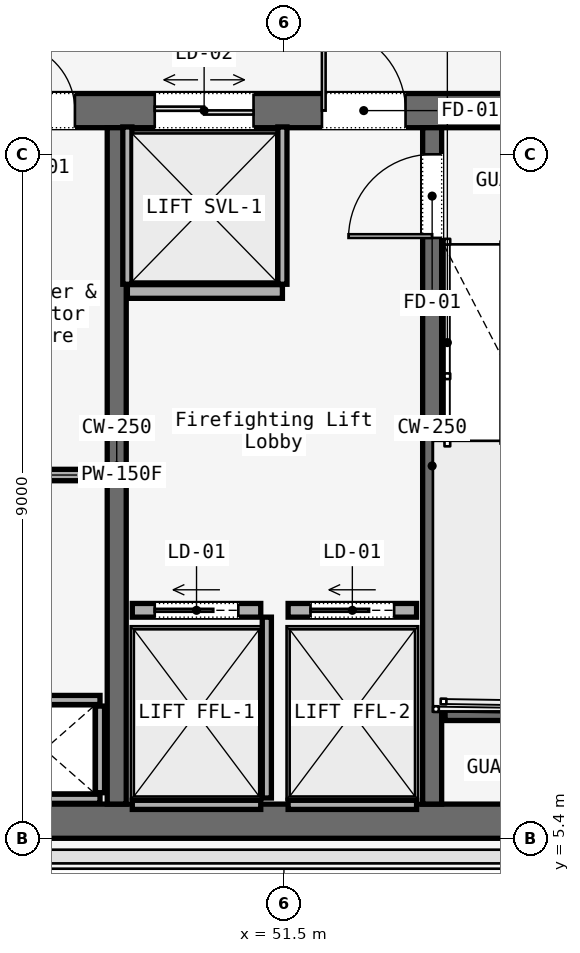
"""IFC4 building model, lengths in metres.
Left out: names, types, materials, properties, quantities, classifications, styles, units other than length and angle.
Written with IfcOpenShell. Run it as: python <this file> out.ifc"""

import sys

from ifc_helpers import new_model, si_unit, direction, frame, frame_2d, origin, place, context, subcontext, project, spatial, rectangle, extrude, element, fill, save


model = new_model("IFC4")
c1 = context("Model", 3, precision=1e-05, world=origin(), true_north=direction((0.0, 1.0)))
c2 = subcontext(c1, "Body", "Model", "MODEL_VIEW")
j1 = project(units=[si_unit("LENGTHUNIT", "METRE"), si_unit("PLANEANGLEUNIT", "RADIAN")], contexts=[c1])
p1 = place(None, origin())
s1 = spatial("IfcSite", under=j1, at=p1, CompositionType="ELEMENT")
p2 = place(p1, origin())
s2 = spatial("IfcBuilding", under=s1, at=p2, CompositionType="ELEMENT")
p3 = place(p2, frame((0.0, 0.0, 66.4)))
s3 = spatial("IfcBuildingStorey", under=s2, at=p3, CompositionType="ELEMENT", Elevation=66.4)
p4 = place(p3, frame((26.45, 14.975, 0.0), z_axis=(0.0, 0.0, 1.0), x_axis=(1.0, 0.0, 0.0)))
e1 = element("IfcWall", 1, at=p4, inside=s3, PredefinedType="SOLIDWALL", context=c2, shape_type="SweptSolid", body=[
    extrude(rectangle(XDim=31.1, YDim=0.45, at=frame_2d((15.55, 0.0))), origin(), (0.0, 0.0, 1.0), 3.58),
])
p5 = place(p4, frame((1.65, 0.0, 0.0)))
e2 = element("IfcOpeningElement", 2, at=p5, cuts=e1, PredefinedType="OPENING", context=c2, shape_type="SweptSolid", body=[
    extrude(rectangle(XDim=1.1, YDim=2.2, at=frame_2d((0.55, 1.1))), frame((0.0, 0.225, 0.0), z_axis=(0.0, -1.0, 0.0), x_axis=(1.0, 0.0, 0.0)), (0.0, 0.0, 1.0), 0.45),
])
p6 = place(p4, frame((13.65, 0.0, 0.0)))
e3 = element("IfcOpeningElement", 3, at=p6, cuts=e1, PredefinedType="OPENING", context=c2, shape_type="SweptSolid", body=[
    extrude(rectangle(XDim=1.1, YDim=2.2, at=frame_2d((0.55, 1.1))), frame((0.0, 0.225, 0.0), z_axis=(0.0, -1.0, 0.0), x_axis=(1.0, 0.0, 0.0)), (0.0, 0.0, 1.0), 0.45),
])
p7 = place(p4, frame((25.55, 0.0, 0.0)))
e4 = element("IfcOpeningElement", 4, at=p7, cuts=e1, PredefinedType="OPENING", context=c2, shape_type="SweptSolid", body=[
    extrude(rectangle(XDim=1.1, YDim=2.2, at=frame_2d((0.55, 1.1))), frame((0.0, 0.225, 0.0), z_axis=(0.0, -1.0, 0.0), x_axis=(1.0, 0.0, 0.0)), (0.0, 0.0, 1.0), 0.45),
])
p8 = place(p4, frame((10.7, 0.0, 0.0)))
e5 = element("IfcOpeningElement", 5, at=p8, cuts=e1, PredefinedType="OPENING", context=c2, shape_type="SweptSolid", body=[
    extrude(rectangle(XDim=1.4, YDim=2.2, at=frame_2d((0.7, 1.1))), frame((0.0, 0.225, 0.0), z_axis=(0.0, -1.0, 0.0), x_axis=(1.0, 0.0, 0.0)), (0.0, 0.0, 1.0), 0.45),
])
p9 = place(p4, frame((19.35, 0.0, 0.0)))
e6 = element("IfcOpeningElement", 6, at=p9, cuts=e1, PredefinedType="OPENING", context=c2, shape_type="SweptSolid", body=[
    extrude(rectangle(XDim=1.1, YDim=2.2, at=frame_2d((0.55, 1.1))), frame((0.0, 0.225, 0.0), z_axis=(0.0, -1.0, 0.0), x_axis=(1.0, 0.0, 0.0)), (0.0, 0.0, 1.0), 0.45),
])
p10 = place(p4, frame((21.4, 0.0, 0.0)))
e7 = element("IfcOpeningElement", 7, at=p10, cuts=e1, PredefinedType="OPENING", context=c2, shape_type="SweptSolid", body=[
    extrude(rectangle(XDim=0.9, YDim=2.1, at=frame_2d((0.45, 1.05))), frame((0.0, 0.225, 0.0), z_axis=(0.0, -1.0, 0.0), x_axis=(1.0, 0.0, 0.0)), (0.0, 0.0, 1.0), 0.45),
])
p11 = place(p4, frame((23.35, 0.0, 0.0)))
e8 = element("IfcOpeningElement", 8, at=p11, cuts=e1, PredefinedType="OPENING", context=c2, shape_type="SweptSolid", body=[
    extrude(rectangle(XDim=1.3, YDim=2.3, at=frame_2d((0.65, 1.15))), frame((0.0, 0.225, 0.0), z_axis=(0.0, -1.0, 0.0), x_axis=(1.0, 0.0, 0.0)), (0.0, 0.0, 1.0), 0.45),
])
p12 = place(p3, frame((26.45, 5.625, 0.0), z_axis=(0.0, 0.0, 1.0), x_axis=(1.0, 0.0, 0.0)))
e9 = element("IfcWall", 9, at=p12, inside=s3, PredefinedType="SOLIDWALL", context=c2, shape_type="SweptSolid", body=[
    extrude(rectangle(XDim=31.1, YDim=0.45, at=frame_2d((15.55, 0.0))), origin(), (0.0, 0.0, 1.0), 3.58),
])
p13 = place(p3, frame((49.3, 5.85, 0.0), z_axis=(0.0, 0.0, 1.0), x_axis=(0.0, 1.0, 0.0)))
e10 = element("IfcWall", 10, at=p13, inside=s3, PredefinedType="SOLIDWALL", context=c2, shape_type="SweptSolid", body=[
    extrude(rectangle(XDim=8.9, YDim=0.25, at=frame_2d((4.45, 0.0))), origin(), (0.0, 0.0, 1.0), 3.58),
])
p14 = place(p3, frame((53.45, 5.85, 0.0), z_axis=(0.0, 0.0, 1.0), x_axis=(0.0, 1.0, 0.0)))
e11 = element("IfcWall", 11, at=p14, inside=s3, PredefinedType="SOLIDWALL", context=c2, shape_type="SweptSolid", body=[
    extrude(rectangle(XDim=8.9, YDim=0.25, at=frame_2d((4.45, 0.0))), origin(), (0.0, 0.0, 1.0), 3.58),
])
p15 = place(p14, frame((7.45, 0.0, 0.0)))
e12 = element("IfcOpeningElement", 12, at=p15, cuts=e11, PredefinedType="OPENING", context=c2, shape_type="SweptSolid", body=[
    extrude(rectangle(XDim=1.1, YDim=2.2, at=frame_2d((0.55, 1.1))), frame((0.0, 0.125, 0.0), z_axis=(0.0, -1.0, 0.0), x_axis=(1.0, 0.0, 0.0)), (0.0, 0.0, 1.0), 0.25),
])
p16 = place(p3, frame((53.62, 7.05, 0.0), z_axis=(0.0, 0.0, 1.0), x_axis=(1.0, 0.0, 0.0)))
e13 = element("IfcWall", 13, at=p16, inside=s3, PredefinedType="SOLIDWALL", context=c2, shape_type="SweptSolid", body=[
    extrude(rectangle(XDim=3.115, YDim=0.2, at=frame_2d((1.558, 0.0))), origin(), (0.0, 0.0, 1.0), 3.8),
])
for number, where, z_axis, x_axis in (
    (14, (47.62, 5.92, 0.0), (0.0, 0.0, 1.0), (1.0, 0.0, 0.0)),
    (15, (47.62, 7.22, 0.0), (0.0, 0.0, 1.0), (1.0, 0.0, 0.0)),
):
    element("IfcWall", number, at=place(p3, frame(where, z_axis=z_axis, x_axis=x_axis)), inside=s3, PredefinedType="SOLIDWALL", context=c2, shape_type="SweptSolid", body=[
        extrude(rectangle(XDim=1.46, YDim=0.12, at=frame_2d((0.73, 0.0))), origin(), (0.0, 0.0, 1.0), 2.95),
    ])
p17 = place(p3, frame((49.08, 6.0, 0.0), z_axis=(0.0, 0.0, 1.0), x_axis=(0.0, 1.0, 0.0)))
e16 = element("IfcWall", 16, at=p17, inside=s3, PredefinedType="SOLIDWALL", context=c2, shape_type="SweptSolid", body=[
    extrude(rectangle(XDim=1.14, YDim=0.12, at=frame_2d((0.57, 0.0))), origin(), (0.0, 0.0, 1.0), 2.95),
])
p18 = place(p3, frame((47.45, 10.18, 0.0), z_axis=(0.0, 0.0, 1.0), x_axis=(1.0, 0.0, 0.0)))
e17 = element("IfcWall", 17, at=p18, inside=s3, PredefinedType="PARTITIONING", context=c2, shape_type="SweptSolid", body=[
    extrude(rectangle(XDim=1.73, YDim=0.15, at=frame_2d((0.865, 0.0))), origin(), (0.0, 0.0, 1.0), 2.95),
])
p19 = place(p3, frame((49.505, 8.4, 0.0), z_axis=(0.0, 0.0, 1.0), x_axis=(1.0, 0.0, 0.0)))
e18 = element("IfcWall", 18, at=p19, inside=s3, PredefinedType="SOLIDWALL", context=c2, shape_type="SweptSolid", body=[
    extrude(rectangle(XDim=1.69, YDim=0.18, at=frame_2d((0.845, 0.0))), origin(), (0.0, 0.0, 1.0), 2.95),
])
p20 = place(p19, frame((0.295, 0.0, 0.0)))
e19 = element("IfcOpeningElement", 19, at=p20, cuts=e18, PredefinedType="OPENING", context=c2, shape_type="SweptSolid", body=[
    extrude(rectangle(XDim=1.1, YDim=2.2, at=frame_2d((0.55, 1.1))), frame((0.0, 0.09, 0.0), z_axis=(0.0, -1.0, 0.0), x_axis=(1.0, 0.0, 0.0)), (0.0, 0.0, 1.0), 0.18),
])
p21 = place(p3, frame((49.505, 5.84, 0.0), z_axis=(0.0, 0.0, 1.0), x_axis=(1.0, 0.0, 0.0)))
e20 = element("IfcWall", 20, at=p21, inside=s3, PredefinedType="SOLIDWALL", context=c2, shape_type="SweptSolid", body=[
    extrude(rectangle(XDim=1.69, YDim=0.12, at=frame_2d((0.845, 0.0))), origin(), (0.0, 0.0, 1.0), 2.95),
])
p22 = place(p3, frame((51.275, 5.93, 0.0), z_axis=(0.0, 0.0, 1.0), x_axis=(0.0, 1.0, 0.0)))
e21 = element("IfcWall", 21, at=p22, inside=s3, PredefinedType="SOLIDWALL", context=c2, shape_type="SweptSolid", body=[
    extrude(rectangle(XDim=2.38, YDim=0.12, at=frame_2d((1.19, 0.0))), origin(), (0.0, 0.0, 1.0), 2.95),
])
p23 = place(p3, frame((51.555, 8.4, 0.0), z_axis=(0.0, 0.0, 1.0), x_axis=(1.0, 0.0, 0.0)))
e22 = element("IfcWall", 22, at=p23, inside=s3, PredefinedType="SOLIDWALL", context=c2, shape_type="SweptSolid", body=[
    extrude(rectangle(XDim=1.69, YDim=0.18, at=frame_2d((0.845, 0.0))), origin(), (0.0, 0.0, 1.0), 2.95),
])
p24 = place(p23, frame((0.295, 0.0, 0.0)))
e23 = element("IfcOpeningElement", 23, at=p24, cuts=e22, PredefinedType="OPENING", context=c2, shape_type="SweptSolid", body=[
    extrude(rectangle(XDim=1.1, YDim=2.2, at=frame_2d((0.55, 1.1))), frame((0.0, 0.09, 0.0), z_axis=(0.0, -1.0, 0.0), x_axis=(1.0, 0.0, 0.0)), (0.0, 0.0, 1.0), 0.18),
])
p25 = place(p3, frame((51.555, 5.84, 0.0), z_axis=(0.0, 0.0, 1.0), x_axis=(1.0, 0.0, 0.0)))
e24 = element("IfcWall", 24, at=p25, inside=s3, PredefinedType="SOLIDWALL", context=c2, shape_type="SweptSolid", body=[
    extrude(rectangle(XDim=1.69, YDim=0.12, at=frame_2d((0.845, 0.0))), origin(), (0.0, 0.0, 1.0), 2.95),
])
p26 = place(p3, frame((49.44, 12.595, 0.0), z_axis=(0.0, 0.0, 1.0), x_axis=(1.0, 0.0, 0.0)))
e25 = element("IfcWall", 25, at=p26, inside=s3, PredefinedType="SOLIDWALL", context=c2, shape_type="SweptSolid", body=[
    extrude(rectangle(XDim=2.04, YDim=0.18, at=frame_2d((1.02, 0.0))), origin(), (0.0, 0.0, 1.0), 2.95),
])
for number, where, z_axis, x_axis in (
    (26, (49.44, 12.69, 0.0), (0.0, 0.0, 1.0), (0.0, 1.0, 0.0)),
    (27, (51.48, 12.69, 0.0), (0.0, 0.0, 1.0), (0.0, 1.0, 0.0)),
):
    element("IfcWall", number, at=place(p3, frame(where, z_axis=z_axis, x_axis=x_axis)), inside=s3, PredefinedType="SOLIDWALL", context=c2, shape_type="SweptSolid", body=[
        extrude(rectangle(XDim=2.07, YDim=0.12, at=frame_2d((1.035, 0.0))), origin(), (0.0, 0.0, 1.0), 2.95),
    ])
p27 = place(p7, origin())
e28 = element("IfcDoor", 28, at=p27, inside=s3, OperationType="SINGLE_SWING_RIGHT", PredefinedType="DOOR", context=c2, shape_type="SweptSolid", body=[
    extrude(rectangle(XDim=1.1, YDim=2.2, at=frame_2d((0.55, 1.1))), frame((0.0, 0.025, 0.0), z_axis=(0.0, -1.0, 0.0), x_axis=(1.0, 0.0, 0.0)), (0.0, 0.0, 1.0), 0.05),
])
fill(e4, e28)
p28 = place(p10, origin())
e29 = element("IfcDoor", 29, at=p28, inside=s3, OperationType="SINGLE_SWING_LEFT", PredefinedType="DOOR", context=c2, shape_type="SweptSolid", body=[
    extrude(rectangle(XDim=0.9, YDim=2.1, at=frame_2d((0.45, 1.05))), frame((0.0, 0.025, 0.0), z_axis=(0.0, -1.0, 0.0), x_axis=(1.0, 0.0, 0.0)), (0.0, 0.0, 1.0), 0.05),
])
fill(e7, e29)
p29 = place(p15, origin())
e30 = element("IfcDoor", 30, at=p29, inside=s3, OperationType="SINGLE_SWING_LEFT", PredefinedType="DOOR", context=c2, shape_type="SweptSolid", body=[
    extrude(rectangle(XDim=1.1, YDim=2.2, at=frame_2d((0.55, 1.1))), frame((0.0, 0.025, 0.0), z_axis=(0.0, -1.0, 0.0), x_axis=(1.0, 0.0, 0.0)), (0.0, 0.0, 1.0), 0.05),
])
fill(e12, e30)
p30 = place(p20, origin())
e31 = element("IfcDoor", 31, at=p30, inside=s3, OperationType="SLIDING_TO_LEFT", PredefinedType="DOOR", context=c2, shape_type="SweptSolid", body=[
    extrude(rectangle(XDim=1.1, YDim=2.2, at=frame_2d((0.55, 1.1))), frame((0.0, 0.025, 0.0), z_axis=(0.0, -1.0, 0.0), x_axis=(1.0, 0.0, 0.0)), (0.0, 0.0, 1.0), 0.05),
])
fill(e19, e31)
p31 = place(p24, origin())
e32 = element("IfcDoor", 32, at=p31, inside=s3, OperationType="SLIDING_TO_LEFT", PredefinedType="DOOR", context=c2, shape_type="SweptSolid", body=[
    extrude(rectangle(XDim=1.1, YDim=2.2, at=frame_2d((0.55, 1.1))), frame((0.0, 0.025, 0.0), z_axis=(0.0, -1.0, 0.0), x_axis=(1.0, 0.0, 0.0)), (0.0, 0.0, 1.0), 0.05),
])
fill(e23, e32)
p32 = place(p11, origin())
e33 = element("IfcDoor", 33, at=p32, inside=s3, OperationType="DOUBLE_DOOR_SLIDING", PredefinedType="DOOR", context=c2, shape_type="SweptSolid", body=[
    extrude(rectangle(XDim=1.3, YDim=2.3, at=frame_2d((0.65, 1.15))), frame((0.0, 0.025, 0.0), z_axis=(0.0, -1.0, 0.0), x_axis=(1.0, 0.0, 0.0)), (0.0, 0.0, 1.0), 0.05),
])
fill(e8, e33)
save(model, sys.argv[1])
